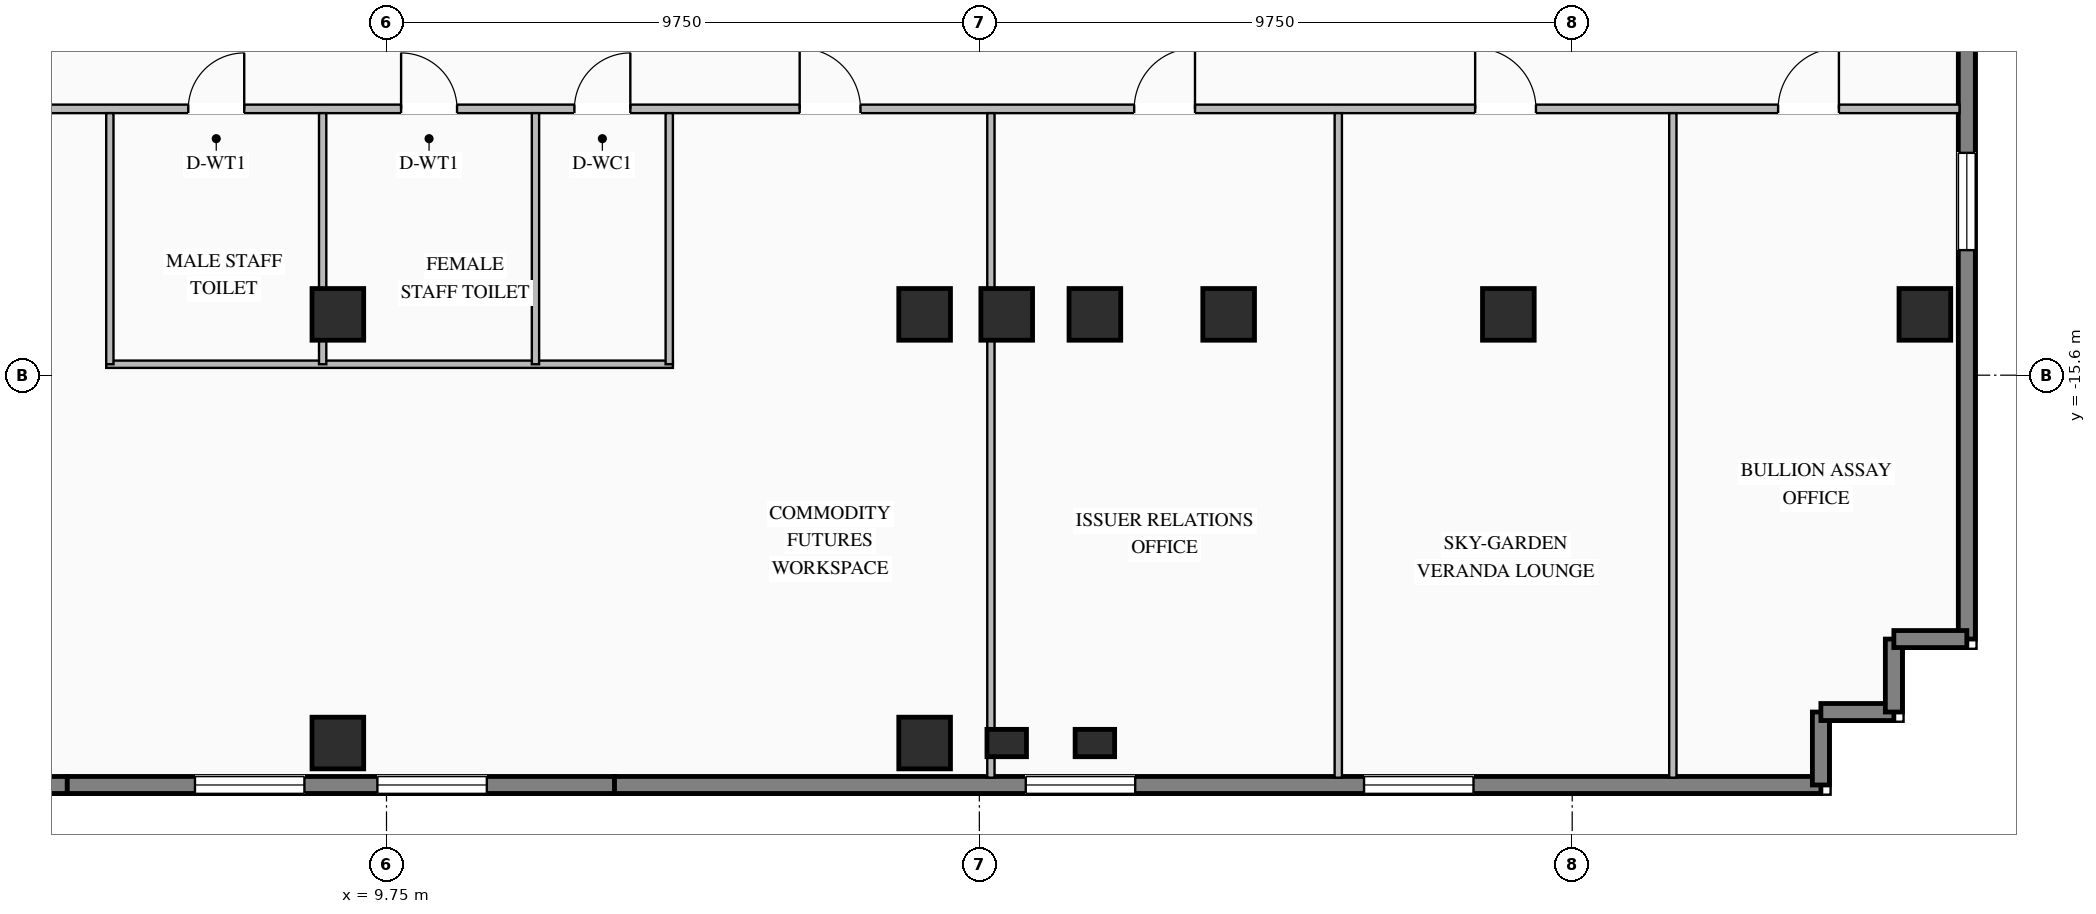
"""IFC4 building model, lengths in metres.
Left out: names, types, materials, properties, quantities, classifications, styles, units other than length and angle.
Written with IfcOpenShell. Run it as: python <this file> out.ifc"""

import sys

from ifc_helpers import new_model, si_unit, direction, frame, frame_2d, origin, origin_2d, place, context, subcontext, project, spatial, rectangle, i_section, extrude, element, fill, save


model = new_model("IFC4")
c1 = context("Model", 3, precision=1e-05, world=origin(), true_north=direction((0.0, 1.0)))
c2 = subcontext(c1, "Body", "Model", "MODEL_VIEW")
j1 = project(units=[si_unit("LENGTHUNIT", "METRE"), si_unit("PLANEANGLEUNIT", "RADIAN")], contexts=[c1])
p1 = place(None, origin())
s1 = spatial("IfcSite", under=j1, at=p1, CompositionType="ELEMENT")
p2 = place(p1, origin())
s2 = spatial("IfcBuilding", under=s1, at=p2, CompositionType="ELEMENT")
p3 = place(p2, frame((0.0, 0.0, 41.55)))
s3 = spatial("IfcBuildingStorey", under=s2, at=p3, CompositionType="ELEMENT", Elevation=41.55)
for number, where, z_axis, x_axis in (
    (1, (8.95, -14.6, 0.0), (0.0, 0.0, 1.0), (1.0, 0.0, 0.0)),
    (2, (18.6, -14.6, 0.0), (0.0, 0.0, 1.0), (1.0, 0.0, 0.0)),
    (3, (19.95, -14.6, 0.0), (0.0, 0.0, 1.0), (1.0, 0.0, 0.0)),
    (4, (21.4, -14.6, 0.0), (0.0, 0.0, 1.0), (1.0, 0.0, 0.0)),
    (5, (23.6, -14.6, 0.0), (0.0, 0.0, 1.0), (1.0, 0.0, 0.0)),
    (6, (28.2, -14.6, 0.0), (0.0, 0.0, 1.0), (1.0, 0.0, 0.0)),
    (7, (8.95, -21.65, 0.0), (0.0, 0.0, 1.0), (1.0, 0.0, 0.0)),
    (8, (18.6, -21.65, 0.0), (0.0, 0.0, 1.0), (1.0, 0.0, 0.0)),
    (9, (35.05, -14.6, 0.0), (0.0, 0.0, 1.0), (1.0, 0.0, 0.0)),
):
    element("IfcColumn", number, at=place(p3, frame(where, z_axis=z_axis, x_axis=x_axis)), inside=s3, PredefinedType="COLUMN", context=c2, shape_type="SweptSolid", body=[
        extrude(i_section(OverallWidth=0.85, OverallDepth=0.85, WebThickness=0.032, FlangeThickness=0.048, at=origin_2d()), origin(), (0.0, 0.0, 1.0), 3.45),
    ])
for number, where, z_axis, x_axis in (
    (10, (19.95, -21.65, 0.0), (0.0, 0.0, 1.0), (1.0, 0.0, 0.0)),
    (11, (21.4, -21.65, 0.0), (0.0, 0.0, 1.0), (1.0, 0.0, 0.0)),
):
    element("IfcColumn", number, at=place(p3, frame(where, z_axis=z_axis, x_axis=x_axis)), inside=s3, PredefinedType="PILASTER", context=c2, shape_type="SweptSolid", body=[
        extrude(rectangle(XDim=0.65, YDim=0.45, at=origin_2d()), origin(), (0.0, 0.0, 1.0), 3.45),
    ])
p4 = place(p3, frame((4.5, -22.34, 0.0), z_axis=(0.0, 0.0, 1.0), x_axis=(-1.0, 0.0, 0.0)))
e12 = element("IfcWall", 12, at=p4, inside=s3, PredefinedType="STANDARD", context=c2, shape_type="SweptSolid", body=[
    extrude(rectangle(XDim=9.0, YDim=0.28, at=frame_2d((4.5, 0.0))), origin(), (0.0, 0.0, 1.0), 3.25),
])
p5 = place(p4, frame((2.1, 0.0, 0.76)))
e13 = element("IfcOpeningElement", 13, at=p5, cuts=e12, PredefinedType="OPENING", context=c2, shape_type="SweptSolid", body=[
    extrude(rectangle(XDim=1.8, YDim=1.95, at=frame_2d((0.9, 0.975))), frame((0.0, 0.15, 0.0), z_axis=(0.0, -1.0, 0.0), x_axis=(1.0, 0.0, 0.0)), (0.0, 0.0, 1.0), 0.3),
])
p6 = place(p4, frame((5.1, 0.0, 0.76)))
e14 = element("IfcOpeningElement", 14, at=p6, cuts=e12, PredefinedType="OPENING", context=c2, shape_type="SweptSolid", body=[
    extrude(rectangle(XDim=1.8, YDim=1.95, at=frame_2d((0.9, 0.975))), frame((0.0, 0.15, 0.0), z_axis=(0.0, -1.0, 0.0), x_axis=(1.0, 0.0, 0.0)), (0.0, 0.0, 1.0), 0.3),
])
p7 = place(p3, frame((13.5, -22.34, 0.0), z_axis=(0.0, 0.0, 1.0), x_axis=(-1.0, 0.0, 0.0)))
e15 = element("IfcWall", 15, at=p7, inside=s3, PredefinedType="STANDARD", context=c2, shape_type="SweptSolid", body=[
    extrude(rectangle(XDim=9.0, YDim=0.28, at=frame_2d((4.5, 0.0))), origin(), (0.0, 0.0, 1.0), 3.25),
])
p8 = place(p7, frame((2.1, 0.0, 0.76)))
e16 = element("IfcOpeningElement", 16, at=p8, cuts=e15, PredefinedType="OPENING", context=c2, shape_type="SweptSolid", body=[
    extrude(rectangle(XDim=1.8, YDim=1.95, at=frame_2d((0.9, 0.975))), frame((0.0, 0.15, 0.0), z_axis=(0.0, -1.0, 0.0), x_axis=(1.0, 0.0, 0.0)), (0.0, 0.0, 1.0), 0.3),
])
p9 = place(p7, frame((5.1, 0.0, 0.76)))
e17 = element("IfcOpeningElement", 17, at=p9, cuts=e15, PredefinedType="OPENING", context=c2, shape_type="SweptSolid", body=[
    extrude(rectangle(XDim=1.8, YDim=1.95, at=frame_2d((0.9, 0.975))), frame((0.0, 0.15, 0.0), z_axis=(0.0, -1.0, 0.0), x_axis=(1.0, 0.0, 0.0)), (0.0, 0.0, 1.0), 0.3),
])
p10 = place(p3, frame((33.34, -22.34, 0.0), z_axis=(0.0, 0.0, 1.0), x_axis=(-1.0, 0.0, 0.0)))
e18 = element("IfcWall", 18, at=p10, inside=s3, PredefinedType="STANDARD", context=c2, shape_type="SweptSolid", body=[
    extrude(rectangle(XDim=19.84, YDim=0.28, at=frame_2d((9.92, 0.0))), origin(), (0.0, 0.0, 1.0), 3.25),
])
p11 = place(p10, frame((5.713, 0.0, 0.76)))
e19 = element("IfcOpeningElement", 19, at=p11, cuts=e18, PredefinedType="OPENING", context=c2, shape_type="SweptSolid", body=[
    extrude(rectangle(XDim=1.8, YDim=1.95, at=frame_2d((0.9, 0.975))), frame((0.0, 0.15, 0.0), z_axis=(0.0, -1.0, 0.0), x_axis=(1.0, 0.0, 0.0)), (0.0, 0.0, 1.0), 0.3),
])
p12 = place(p10, frame((11.277, 0.0, 0.76)))
e20 = element("IfcOpeningElement", 20, at=p12, cuts=e18, PredefinedType="OPENING", context=c2, shape_type="SweptSolid", body=[
    extrude(rectangle(XDim=1.8, YDim=1.95, at=frame_2d((0.9, 0.975))), frame((0.0, 0.15, 0.0), z_axis=(0.0, -1.0, 0.0), x_axis=(1.0, 0.0, 0.0)), (0.0, 0.0, 1.0), 0.3),
])
p13 = place(p3, frame((35.74, 0.0, 0.0), z_axis=(0.0, 0.0, 1.0), x_axis=(0.0, -1.0, 0.0)))
e21 = element("IfcWall", 21, at=p13, inside=s3, PredefinedType="STANDARD", context=c2, shape_type="SweptSolid", body=[
    extrude(rectangle(XDim=19.94, YDim=0.28, at=frame_2d((9.97, 0.0))), origin(), (0.0, 0.0, 1.0), 3.25),
])
p14 = place(p13, frame((5.847, 0.0, 0.76)))
e22 = element("IfcOpeningElement", 22, at=p14, cuts=e21, PredefinedType="OPENING", context=c2, shape_type="SweptSolid", body=[
    extrude(rectangle(XDim=1.6, YDim=1.95, at=frame_2d((0.8, 0.975))), frame((0.0, 0.15, 0.0), z_axis=(0.0, -1.0, 0.0), x_axis=(1.0, 0.0, 0.0)), (0.0, 0.0, 1.0), 0.3),
])
p15 = place(p13, frame((11.943, 0.0, 0.76)))
e23 = element("IfcOpeningElement", 23, at=p15, cuts=e21, PredefinedType="OPENING", context=c2, shape_type="SweptSolid", body=[
    extrude(rectangle(XDim=1.6, YDim=1.95, at=frame_2d((0.8, 0.975))), frame((0.0, 0.15, 0.0), z_axis=(0.0, -1.0, 0.0), x_axis=(1.0, 0.0, 0.0)), (0.0, 0.0, 1.0), 0.3),
])
p16 = place(p3, frame((33.34, -22.34, 0.0), z_axis=(0.0, 0.0, 1.0), x_axis=(0.0, 1.0, 0.0)))
e24 = element("IfcWall", 24, at=p16, inside=s3, PredefinedType="STANDARD", context=c2, shape_type="SweptSolid", body=[
    extrude(rectangle(XDim=1.2, YDim=0.28, at=frame_2d((0.6, 0.0))), origin(), (0.0, 0.0, 1.0), 3.25),
])
for number, where, z_axis, x_axis in (
    (25, (33.34, -21.14, 0.0), (0.0, 0.0, 1.0), (1.0, 0.0, 0.0)),
    (26, (34.54, -21.14, 0.0), (0.0, 0.0, 1.0), (0.0, 1.0, 0.0)),
    (27, (34.54, -19.94, 0.0), (0.0, 0.0, 1.0), (1.0, 0.0, 0.0)),
):
    element("IfcWall", number, at=place(p3, frame(where, z_axis=z_axis, x_axis=x_axis)), inside=s3, PredefinedType="STANDARD", context=c2, shape_type="SweptSolid", body=[
        extrude(rectangle(XDim=1.2, YDim=0.28, at=frame_2d((0.6, 0.0))), origin(), (0.0, 0.0, 1.0), 3.25),
    ])
p17 = place(p3, frame((-35.62, -11.22, 0.0), z_axis=(0.0, 0.0, 1.0), x_axis=(1.0, 0.0, 0.0)))
e28 = element("IfcWall", 28, at=p17, inside=s3, PredefinedType="STANDARD", context=c2, shape_type="SweptSolid", body=[
    extrude(rectangle(XDim=71.24, YDim=0.14, at=frame_2d((35.62, 0.0))), origin(), (0.0, 0.0, 1.0), 2.745),
])
p18 = place(p17, frame((42.11, 0.0, 0.0)))
e29 = element("IfcOpeningElement", 29, at=p18, cuts=e28, PredefinedType="OPENING", context=c2, shape_type="SweptSolid", body=[
    extrude(rectangle(XDim=0.92, YDim=2.08, at=frame_2d((0.46, 1.04))), frame((0.0, 0.08, 0.0), z_axis=(0.0, -1.0, 0.0), x_axis=(1.0, 0.0, 0.0)), (0.0, 0.0, 1.0), 0.16),
])
p19 = place(p17, frame((45.61, 0.0, 0.0)))
e30 = element("IfcOpeningElement", 30, at=p19, cuts=e28, PredefinedType="OPENING", context=c2, shape_type="SweptSolid", body=[
    extrude(rectangle(XDim=0.92, YDim=2.08, at=frame_2d((0.46, 1.04))), frame((0.0, 0.08, 0.0), z_axis=(0.0, -1.0, 0.0), x_axis=(1.0, 0.0, 0.0)), (0.0, 0.0, 1.0), 0.16),
])
p20 = place(p17, frame((48.46, 0.0, 0.0)))
e31 = element("IfcOpeningElement", 31, at=p20, cuts=e28, PredefinedType="OPENING", context=c2, shape_type="SweptSolid", body=[
    extrude(rectangle(XDim=0.92, YDim=2.08, at=frame_2d((0.46, 1.04))), frame((0.0, 0.08, 0.0), z_axis=(0.0, -1.0, 0.0), x_axis=(1.0, 0.0, 0.0)), (0.0, 0.0, 1.0), 0.16),
])
p21 = place(p17, frame((4.751, 0.0, 0.0)))
e32 = element("IfcOpeningElement", 32, at=p21, cuts=e28, PredefinedType="OPENING", context=c2, shape_type="SweptSolid", body=[
    extrude(rectangle(XDim=1.0, YDim=2.08, at=frame_2d((0.5, 1.04))), frame((0.0, 0.08, 0.0), z_axis=(0.0, -1.0, 0.0), x_axis=(1.0, 0.0, 0.0)), (0.0, 0.0, 1.0), 0.16),
])
p22 = place(p17, frame((15.252, 0.0, 0.0)))
e33 = element("IfcOpeningElement", 33, at=p22, cuts=e28, PredefinedType="OPENING", context=c2, shape_type="SweptSolid", body=[
    extrude(rectangle(XDim=1.0, YDim=2.08, at=frame_2d((0.5, 1.04))), frame((0.0, 0.08, 0.0), z_axis=(0.0, -1.0, 0.0), x_axis=(1.0, 0.0, 0.0)), (0.0, 0.0, 1.0), 0.16),
])
p23 = place(p17, frame((26.054, 0.0, 0.0)))
e34 = element("IfcOpeningElement", 34, at=p23, cuts=e28, PredefinedType="OPENING", context=c2, shape_type="SweptSolid", body=[
    extrude(rectangle(XDim=1.0, YDim=2.08, at=frame_2d((0.5, 1.04))), frame((0.0, 0.08, 0.0), z_axis=(0.0, -1.0, 0.0), x_axis=(1.0, 0.0, 0.0)), (0.0, 0.0, 1.0), 0.16),
])
p24 = place(p17, frame((35.836, 0.0, 0.0)))
e35 = element("IfcOpeningElement", 35, at=p24, cuts=e28, PredefinedType="OPENING", context=c2, shape_type="SweptSolid", body=[
    extrude(rectangle(XDim=1.0, YDim=2.08, at=frame_2d((0.5, 1.04))), frame((0.0, 0.08, 0.0), z_axis=(0.0, -1.0, 0.0), x_axis=(1.0, 0.0, 0.0)), (0.0, 0.0, 1.0), 0.16),
])
p25 = place(p17, frame((52.165, 0.0, 0.0)))
e36 = element("IfcOpeningElement", 36, at=p25, cuts=e28, PredefinedType="OPENING", context=c2, shape_type="SweptSolid", body=[
    extrude(rectangle(XDim=1.0, YDim=2.08, at=frame_2d((0.5, 1.04))), frame((0.0, 0.08, 0.0), z_axis=(0.0, -1.0, 0.0), x_axis=(1.0, 0.0, 0.0)), (0.0, 0.0, 1.0), 0.16),
])
p26 = place(p17, frame((57.667, 0.0, 0.0)))
e37 = element("IfcOpeningElement", 37, at=p26, cuts=e28, PredefinedType="OPENING", context=c2, shape_type="SweptSolid", body=[
    extrude(rectangle(XDim=1.0, YDim=2.08, at=frame_2d((0.5, 1.04))), frame((0.0, 0.08, 0.0), z_axis=(0.0, -1.0, 0.0), x_axis=(1.0, 0.0, 0.0)), (0.0, 0.0, 1.0), 0.16),
])
p27 = place(p17, frame((63.274, 0.0, 0.0)))
e38 = element("IfcOpeningElement", 38, at=p27, cuts=e28, PredefinedType="OPENING", context=c2, shape_type="SweptSolid", body=[
    extrude(rectangle(XDim=1.0, YDim=2.08, at=frame_2d((0.5, 1.04))), frame((0.0, 0.08, 0.0), z_axis=(0.0, -1.0, 0.0), x_axis=(1.0, 0.0, 0.0)), (0.0, 0.0, 1.0), 0.16),
])
p28 = place(p17, frame((68.257, 0.0, 0.0)))
e39 = element("IfcOpeningElement", 39, at=p28, cuts=e28, PredefinedType="OPENING", context=c2, shape_type="SweptSolid", body=[
    extrude(rectangle(XDim=1.0, YDim=2.08, at=frame_2d((0.5, 1.04))), frame((0.0, 0.08, 0.0), z_axis=(0.0, -1.0, 0.0), x_axis=(1.0, 0.0, 0.0)), (0.0, 0.0, 1.0), 0.16),
])
p29 = place(p3, frame((5.14, -15.42, 0.0), z_axis=(0.0, 0.0, 1.0), x_axis=(1.0, 0.0, 0.0)))
e40 = element("IfcWall", 40, at=p29, inside=s3, PredefinedType="STANDARD", context=c2, shape_type="SweptSolid", body=[
    extrude(rectangle(XDim=9.32, YDim=0.12, at=frame_2d((4.66, 0.0))), origin(), (0.0, 0.0, 1.0), 3.25),
])
for number, where, z_axis, x_axis in (
    (41, (5.2, -15.42, 0.0), (0.0, 0.0, 1.0), (0.0, 1.0, 0.0)),
    (42, (8.7, -15.42, 0.0), (0.0, 0.0, 1.0), (0.0, 1.0, 0.0)),
    (43, (12.2, -15.42, 0.0), (0.0, 0.0, 1.0), (0.0, 1.0, 0.0)),
    (44, (14.4, -15.42, 0.0), (0.0, 0.0, 1.0), (0.0, 1.0, 0.0)),
):
    element("IfcWall", number, at=place(p3, frame(where, z_axis=z_axis, x_axis=x_axis)), inside=s3, PredefinedType="STANDARD", context=c2, shape_type="SweptSolid", body=[
        extrude(rectangle(XDim=4.13, YDim=0.12, at=frame_2d((2.065, 0.0))), origin(), (0.0, 0.0, 1.0), 3.25),
    ])
for number, where, z_axis, x_axis in (
    (45, (19.69, -22.22, 0.0), (0.0, 0.0, 1.0), (0.0, 1.0, 0.0)),
    (46, (25.403, -22.22, 0.0), (0.0, 0.0, 1.0), (0.0, 1.0, 0.0)),
    (47, (30.905, -22.22, 0.0), (0.0, 0.0, 1.0), (0.0, 1.0, 0.0)),
):
    element("IfcWall", number, at=place(p3, frame(where, z_axis=z_axis, x_axis=x_axis)), inside=s3, PredefinedType="STANDARD", context=c2, shape_type="SweptSolid", body=[
        extrude(rectangle(XDim=10.93, YDim=0.12, at=frame_2d((5.465, 0.0))), origin(), (0.0, 0.0, 1.0), 3.25),
    ])
p30 = place(p8, origin())
e48 = element("IfcWindow", 48, at=p30, inside=s3, PartitioningType="SINGLE_PANEL", PredefinedType="WINDOW", context=c2, shape_type="SweptSolid", body=[
    extrude(rectangle(XDim=1.8, YDim=1.95, at=frame_2d((0.9, 0.975))), frame((0.0, 0.03, 0.0), z_axis=(0.0, -1.0, 0.0), x_axis=(1.0, 0.0, 0.0)), (0.0, 0.0, 1.0), 0.06),
])
fill(e16, e48)
p31 = place(p9, origin())
e49 = element("IfcWindow", 49, at=p31, inside=s3, PartitioningType="SINGLE_PANEL", PredefinedType="WINDOW", context=c2, shape_type="SweptSolid", body=[
    extrude(rectangle(XDim=1.8, YDim=1.95, at=frame_2d((0.9, 0.975))), frame((0.0, 0.03, 0.0), z_axis=(0.0, -1.0, 0.0), x_axis=(1.0, 0.0, 0.0)), (0.0, 0.0, 1.0), 0.06),
])
fill(e17, e49)
p32 = place(p11, origin())
e50 = element("IfcWindow", 50, at=p32, inside=s3, PartitioningType="SINGLE_PANEL", PredefinedType="WINDOW", context=c2, shape_type="SweptSolid", body=[
    extrude(rectangle(XDim=1.8, YDim=1.95, at=frame_2d((0.9, 0.975))), frame((0.0, 0.03, 0.0), z_axis=(0.0, -1.0, 0.0), x_axis=(1.0, 0.0, 0.0)), (0.0, 0.0, 1.0), 0.06),
])
fill(e19, e50)
p33 = place(p12, origin())
e51 = element("IfcWindow", 51, at=p33, inside=s3, PartitioningType="SINGLE_PANEL", PredefinedType="WINDOW", context=c2, shape_type="SweptSolid", body=[
    extrude(rectangle(XDim=1.8, YDim=1.95, at=frame_2d((0.9, 0.975))), frame((0.0, 0.03, 0.0), z_axis=(0.0, -1.0, 0.0), x_axis=(1.0, 0.0, 0.0)), (0.0, 0.0, 1.0), 0.06),
])
fill(e20, e51)
p34 = place(p15, origin())
e52 = element("IfcWindow", 52, at=p34, inside=s3, PartitioningType="SINGLE_PANEL", PredefinedType="WINDOW", context=c2, shape_type="SweptSolid", body=[
    extrude(rectangle(XDim=1.6, YDim=1.95, at=frame_2d((0.8, 0.975))), frame((0.0, 0.03, 0.0), z_axis=(0.0, -1.0, 0.0), x_axis=(1.0, 0.0, 0.0)), (0.0, 0.0, 1.0), 0.06),
])
fill(e23, e52)
p35 = place(p18, origin())
e53 = element("IfcDoor", 53, at=p35, inside=s3, OperationType="SINGLE_SWING_RIGHT", PredefinedType="DOOR", context=c2, shape_type="SweptSolid", body=[
    extrude(rectangle(XDim=0.92, YDim=2.08, at=frame_2d((0.46, 1.04))), frame((0.0, 0.025, 0.0), z_axis=(0.0, -1.0, 0.0), x_axis=(1.0, 0.0, 0.0)), (0.0, 0.0, 1.0), 0.05),
])
fill(e29, e53)
p36 = place(p19, origin())
e54 = element("IfcDoor", 54, at=p36, inside=s3, OperationType="SINGLE_SWING_LEFT", PredefinedType="DOOR", context=c2, shape_type="SweptSolid", body=[
    extrude(rectangle(XDim=0.92, YDim=2.08, at=frame_2d((0.46, 1.04))), frame((0.0, 0.025, 0.0), z_axis=(0.0, -1.0, 0.0), x_axis=(1.0, 0.0, 0.0)), (0.0, 0.0, 1.0), 0.05),
])
fill(e30, e54)
p37 = place(p20, origin())
e55 = element("IfcDoor", 55, at=p37, inside=s3, OperationType="SINGLE_SWING_RIGHT", PredefinedType="DOOR", context=c2, shape_type="SweptSolid", body=[
    extrude(rectangle(XDim=0.92, YDim=2.08, at=frame_2d((0.46, 1.04))), frame((0.0, 0.025, 0.0), z_axis=(0.0, -1.0, 0.0), x_axis=(1.0, 0.0, 0.0)), (0.0, 0.0, 1.0), 0.05),
])
fill(e31, e55)
p38 = place(p25, origin())
e56 = element("IfcDoor", 56, at=p38, inside=s3, OperationType="SINGLE_SWING_LEFT", PredefinedType="DOOR", context=c2, shape_type="SweptSolid", body=[
    extrude(rectangle(XDim=1.0, YDim=2.08, at=frame_2d((0.5, 1.04))), frame((0.0, 0.025, 0.0), z_axis=(0.0, -1.0, 0.0), x_axis=(1.0, 0.0, 0.0)), (0.0, 0.0, 1.0), 0.05),
])
fill(e36, e56)
p39 = place(p26, origin())
e57 = element("IfcDoor", 57, at=p39, inside=s3, OperationType="SINGLE_SWING_RIGHT", PredefinedType="DOOR", context=c2, shape_type="SweptSolid", body=[
    extrude(rectangle(XDim=1.0, YDim=2.08, at=frame_2d((0.5, 1.04))), frame((0.0, 0.025, 0.0), z_axis=(0.0, -1.0, 0.0), x_axis=(1.0, 0.0, 0.0)), (0.0, 0.0, 1.0), 0.05),
])
fill(e37, e57)
p40 = place(p27, origin())
e58 = element("IfcDoor", 58, at=p40, inside=s3, OperationType="SINGLE_SWING_LEFT", PredefinedType="DOOR", context=c2, shape_type="SweptSolid", body=[
    extrude(rectangle(XDim=1.0, YDim=2.08, at=frame_2d((0.5, 1.04))), frame((0.0, 0.025, 0.0), z_axis=(0.0, -1.0, 0.0), x_axis=(1.0, 0.0, 0.0)), (0.0, 0.0, 1.0), 0.05),
])
fill(e38, e58)
p41 = place(p28, origin())
e59 = element("IfcDoor", 59, at=p41, inside=s3, OperationType="SINGLE_SWING_RIGHT", PredefinedType="DOOR", context=c2, shape_type="SweptSolid", body=[
    extrude(rectangle(XDim=1.0, YDim=2.08, at=frame_2d((0.5, 1.04))), frame((0.0, 0.025, 0.0), z_axis=(0.0, -1.0, 0.0), x_axis=(1.0, 0.0, 0.0)), (0.0, 0.0, 1.0), 0.05),
])
fill(e39, e59)
save(model, sys.argv[1])
